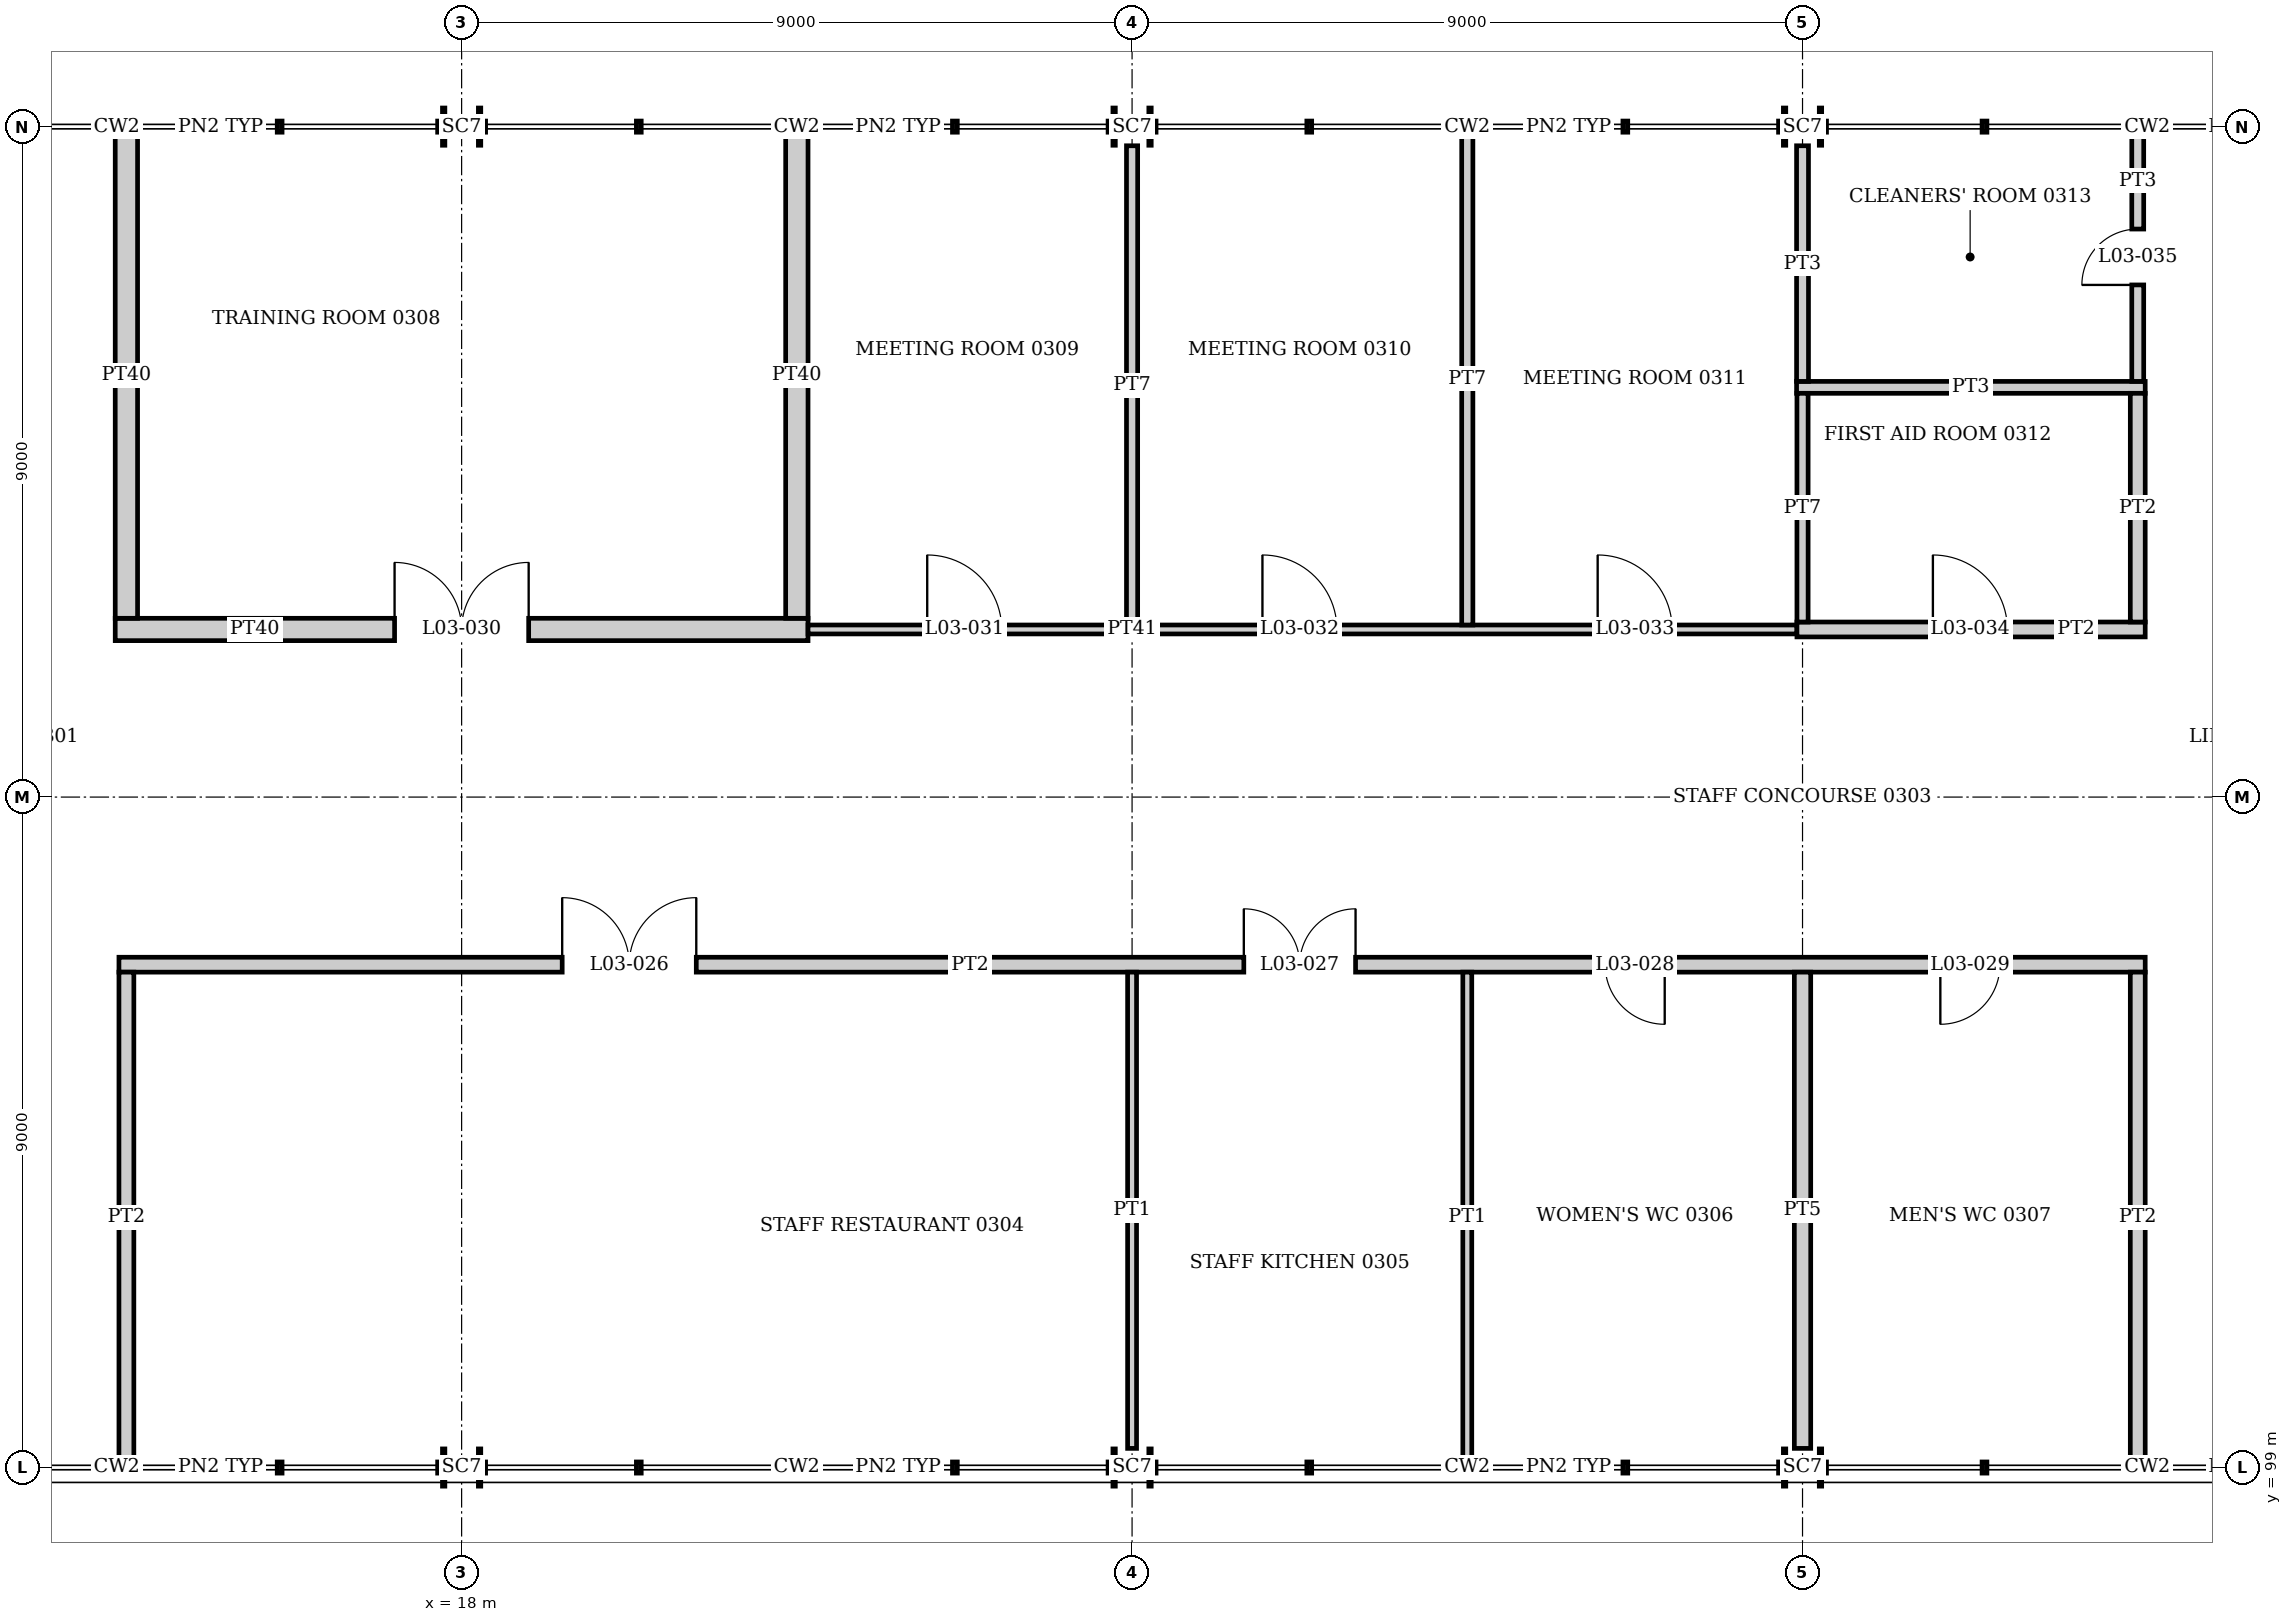
"""IFC4 building model, lengths in metres.
Left out: names, types, materials, properties, quantities, classifications, styles, units other than length and angle.
Written with IfcOpenShell. Run it as: python <this file> out.ifc"""

import sys

from ifc_helpers import new_model, si_unit, direction, frame, frame_2d, origin, origin_2d, place, context, subcontext, project, spatial, rectangle, i_section, extrude, element, fill, save


model = new_model("IFC4")
c1 = context("Model", 3, precision=1e-05, world=origin(), true_north=direction((0.0, 1.0)))
c2 = subcontext(c1, "Body", "Model", "MODEL_VIEW")
j1 = project(units=[si_unit("LENGTHUNIT", "METRE"), si_unit("PLANEANGLEUNIT", "RADIAN")], contexts=[c1])
p1 = place(None, origin())
s1 = spatial("IfcSite", under=j1, at=p1, CompositionType="ELEMENT")
p2 = place(p1, origin())
s2 = spatial("IfcBuilding", under=s1, at=p2, CompositionType="ELEMENT")
p3 = place(p2, frame((0.0, 0.0, 15.0)))
s3 = spatial("IfcBuildingStorey", under=s2, at=p3, CompositionType="ELEMENT", Elevation=15.0)
for number, where, z_axis, x_axis in (
    (1, (18.0, 99.0, 0.0), (0.0, 0.0, 1.0), (0.0, 1.0, 0.0)),
    (2, (18.0, 117.0, 0.0), (0.0, 0.0, 1.0), (0.0, 1.0, 0.0)),
    (3, (27.0, 99.0, 0.0), (0.0, 0.0, 1.0), (0.0, 1.0, 0.0)),
    (4, (27.0, 117.0, 0.0), (0.0, 0.0, 1.0), (0.0, 1.0, 0.0)),
    (5, (36.0, 99.0, 0.0), (0.0, 0.0, 1.0), (0.0, 1.0, 0.0)),
    (6, (36.0, 117.0, 0.0), (0.0, 0.0, 1.0), (0.0, 1.0, 0.0)),
):
    element("IfcColumn", number, at=place(p3, frame(where, z_axis=z_axis, x_axis=x_axis)), inside=s3, PredefinedType="COLUMN", context=c2, shape_type="SweptSolid", body=[
        extrude(i_section(OverallWidth=0.5, OverallDepth=0.514, WebThickness=0.025, FlangeThickness=0.032, at=origin_2d()), origin(), (0.0, 0.0, 1.0), 4.2),
    ])
p4 = place(p3, frame((13.4, 105.75, 0.0), z_axis=(0.0, 0.0, 1.0), x_axis=(1.0, 0.0, 0.0)))
e7 = element("IfcWall", 7, at=p4, inside=s3, PredefinedType="PARTITIONING", context=c2, shape_type="SweptSolid", body=[
    extrude(rectangle(XDim=27.2, YDim=0.2, at=frame_2d((13.6, 0.0))), origin(), (0.0, 0.0, 1.0), 3.25),
])
p5 = place(p4, frame((5.95, 0.0, 0.0)))
e8 = element("IfcOpeningElement", 8, at=p5, cuts=e7, PredefinedType="OPENING", context=c2, shape_type="SweptSolid", body=[
    extrude(rectangle(XDim=1.8, YDim=2.1, at=frame_2d((0.9, 1.05))), frame((0.0, 0.11, 0.0), z_axis=(0.0, -1.0, 0.0), x_axis=(1.0, 0.0, 0.0)), (0.0, 0.0, 1.0), 0.22),
])
p6 = place(p4, frame((15.1, 0.0, 0.0)))
e9 = element("IfcOpeningElement", 9, at=p6, cuts=e7, PredefinedType="OPENING", context=c2, shape_type="SweptSolid", body=[
    extrude(rectangle(XDim=1.5, YDim=2.1, at=frame_2d((0.75, 1.05))), frame((0.0, 0.11, 0.0), z_axis=(0.0, -1.0, 0.0), x_axis=(1.0, 0.0, 0.0)), (0.0, 0.0, 1.0), 0.22),
])
p7 = place(p4, frame((19.95, 0.0, 0.0)))
e10 = element("IfcOpeningElement", 10, at=p7, cuts=e7, PredefinedType="OPENING", context=c2, shape_type="SweptSolid", body=[
    extrude(rectangle(XDim=0.8, YDim=2.1, at=frame_2d((0.4, 1.05))), frame((0.0, 0.11, 0.0), z_axis=(0.0, -1.0, 0.0), x_axis=(1.0, 0.0, 0.0)), (0.0, 0.0, 1.0), 0.22),
])
p8 = place(p4, frame((24.45, 0.0, 0.0)))
e11 = element("IfcOpeningElement", 11, at=p8, cuts=e7, PredefinedType="OPENING", context=c2, shape_type="SweptSolid", body=[
    extrude(rectangle(XDim=0.8, YDim=2.1, at=frame_2d((0.4, 1.05))), frame((0.0, 0.11, 0.0), z_axis=(0.0, -1.0, 0.0), x_axis=(1.0, 0.0, 0.0)), (0.0, 0.0, 1.0), 0.22),
])
p9 = place(p3, frame((13.35, 110.25, 0.0), z_axis=(0.0, 0.0, 1.0), x_axis=(1.0, 0.0, 0.0)))
e12 = element("IfcWall", 12, at=p9, inside=s3, PredefinedType="PARTITIONING", context=c2, shape_type="SweptSolid", body=[
    extrude(rectangle(XDim=9.3, YDim=0.3, at=frame_2d((4.65, 0.0))), origin(), (0.0, 0.0, 1.0), 3.25),
])
p10 = place(p9, frame((3.75, 0.0, 0.0)))
e13 = element("IfcOpeningElement", 13, at=p10, cuts=e12, PredefinedType="OPENING", context=c2, shape_type="SweptSolid", body=[
    extrude(rectangle(XDim=1.8, YDim=2.1, at=frame_2d((0.9, 1.05))), frame((0.0, 0.16, 0.0), z_axis=(0.0, -1.0, 0.0), x_axis=(1.0, 0.0, 0.0)), (0.0, 0.0, 1.0), 0.32),
])
p11 = place(p3, frame((22.65, 110.25, 0.0), z_axis=(0.0, 0.0, 1.0), x_axis=(1.0, 0.0, 0.0)))
e14 = element("IfcWall", 14, at=p11, inside=s3, PredefinedType="PARTITIONING", context=c2, shape_type="SweptSolid", body=[
    extrude(rectangle(XDim=13.275, YDim=0.12, at=frame_2d((6.638, 0.0))), origin(), (0.0, 0.0, 1.0), 3.25),
])
p12 = place(p11, frame((1.6, 0.0, 0.0)))
e15 = element("IfcOpeningElement", 15, at=p12, cuts=e14, PredefinedType="OPENING", context=c2, shape_type="SweptSolid", body=[
    extrude(rectangle(XDim=1.0, YDim=2.1, at=frame_2d((0.5, 1.05))), frame((0.0, 0.07, 0.0), z_axis=(0.0, -1.0, 0.0), x_axis=(1.0, 0.0, 0.0)), (0.0, 0.0, 1.0), 0.14),
])
p13 = place(p11, frame((6.1, 0.0, 0.0)))
e16 = element("IfcOpeningElement", 16, at=p13, cuts=e14, PredefinedType="OPENING", context=c2, shape_type="SweptSolid", body=[
    extrude(rectangle(XDim=1.0, YDim=2.1, at=frame_2d((0.5, 1.05))), frame((0.0, 0.07, 0.0), z_axis=(0.0, -1.0, 0.0), x_axis=(1.0, 0.0, 0.0)), (0.0, 0.0, 1.0), 0.14),
])
p14 = place(p11, frame((10.6, 0.0, 0.0)))
e17 = element("IfcOpeningElement", 17, at=p14, cuts=e14, PredefinedType="OPENING", context=c2, shape_type="SweptSolid", body=[
    extrude(rectangle(XDim=1.0, YDim=2.1, at=frame_2d((0.5, 1.05))), frame((0.0, 0.07, 0.0), z_axis=(0.0, -1.0, 0.0), x_axis=(1.0, 0.0, 0.0)), (0.0, 0.0, 1.0), 0.14),
])
p15 = place(p3, frame((35.925, 110.25, 0.0), z_axis=(0.0, 0.0, 1.0), x_axis=(1.0, 0.0, 0.0)))
e18 = element("IfcWall", 18, at=p15, inside=s3, PredefinedType="PARTITIONING", context=c2, shape_type="SweptSolid", body=[
    extrude(rectangle(XDim=4.675, YDim=0.2, at=frame_2d((2.337, 0.0))), origin(), (0.0, 0.0, 1.0), 3.25),
])
p16 = place(p15, frame((1.825, 0.0, 0.0)))
e19 = element("IfcOpeningElement", 19, at=p16, cuts=e18, PredefinedType="OPENING", context=c2, shape_type="SweptSolid", body=[
    extrude(rectangle(XDim=1.0, YDim=2.1, at=frame_2d((0.5, 1.05))), frame((0.0, 0.11, 0.0), z_axis=(0.0, -1.0, 0.0), x_axis=(1.0, 0.0, 0.0)), (0.0, 0.0, 1.0), 0.22),
])
p17 = place(p3, frame((35.92, 113.5, 0.0), z_axis=(0.0, 0.0, 1.0), x_axis=(1.0, 0.0, 0.0)))
e20 = element("IfcWall", 20, at=p17, inside=s3, PredefinedType="PARTITIONING", context=c2, shape_type="SweptSolid", body=[
    extrude(rectangle(XDim=4.68, YDim=0.16, at=frame_2d((2.34, 0.0))), origin(), (0.0, 0.0, 1.0), 3.25),
])
p18 = place(p3, frame((13.5, 99.075, 0.0), z_axis=(0.0, 0.0, 1.0), x_axis=(0.0, 1.0, 0.0)))
e21 = element("IfcWall", 21, at=p18, inside=s3, PredefinedType="PARTITIONING", context=c2, shape_type="SweptSolid", body=[
    extrude(rectangle(XDim=6.575, YDim=0.2, at=frame_2d((3.288, 0.0))), origin(), (0.0, 0.0, 1.0), 3.25),
])
for number, where, z_axis, x_axis in (
    (22, (13.5, 110.4, 0.0), (0.0, 0.0, 1.0), (0.0, 1.0, 0.0)),
    (23, (22.5, 110.4, 0.0), (0.0, 0.0, 1.0), (0.0, 1.0, 0.0)),
):
    element("IfcWall", number, at=place(p3, frame(where, z_axis=z_axis, x_axis=x_axis)), inside=s3, PredefinedType="PARTITIONING", context=c2, shape_type="SweptSolid", body=[
        extrude(rectangle(XDim=6.525, YDim=0.3, at=frame_2d((3.263, 0.0))), origin(), (0.0, 0.0, 1.0), 3.25),
    ])
p19 = place(p3, frame((27.0, 99.257, 0.0), z_axis=(0.0, 0.0, 1.0), x_axis=(0.0, 1.0, 0.0)))
e24 = element("IfcWall", 24, at=p19, inside=s3, PredefinedType="PARTITIONING", context=c2, shape_type="SweptSolid", body=[
    extrude(rectangle(XDim=6.393, YDim=0.12, at=frame_2d((3.196, 0.0))), origin(), (0.0, 0.0, 1.0), 3.25),
])
p20 = place(p3, frame((27.0, 110.31, 0.0), z_axis=(0.0, 0.0, 1.0), x_axis=(0.0, 1.0, 0.0)))
e25 = element("IfcWall", 25, at=p20, inside=s3, PredefinedType="PARTITIONING", context=c2, shape_type="SweptSolid", body=[
    extrude(rectangle(XDim=6.433, YDim=0.15, at=frame_2d((3.216, 0.0))), origin(), (0.0, 0.0, 1.0), 3.25),
])
p21 = place(p3, frame((31.5, 99.075, 0.0), z_axis=(0.0, 0.0, 1.0), x_axis=(0.0, 1.0, 0.0)))
e26 = element("IfcWall", 26, at=p21, inside=s3, PredefinedType="PARTITIONING", context=c2, shape_type="SweptSolid", body=[
    extrude(rectangle(XDim=6.575, YDim=0.12, at=frame_2d((3.288, 0.0))), origin(), (0.0, 0.0, 1.0), 3.25),
])
p22 = place(p3, frame((31.5, 110.31, 0.0), z_axis=(0.0, 0.0, 1.0), x_axis=(0.0, 1.0, 0.0)))
e27 = element("IfcWall", 27, at=p22, inside=s3, PredefinedType="PARTITIONING", context=c2, shape_type="SweptSolid", body=[
    extrude(rectangle(XDim=6.615, YDim=0.15, at=frame_2d((3.308, 0.0))), origin(), (0.0, 0.0, 1.0), 3.25),
])
p23 = place(p3, frame((36.0, 99.257, 0.0), z_axis=(0.0, 0.0, 1.0), x_axis=(0.0, 1.0, 0.0)))
e28 = element("IfcWall", 28, at=p23, inside=s3, PredefinedType="PLUMBINGWALL", context=c2, shape_type="SweptSolid", body=[
    extrude(rectangle(XDim=6.393, YDim=0.22, at=frame_2d((3.196, 0.0))), origin(), (0.0, 0.0, 1.0), 3.25),
])
p24 = place(p3, frame((36.0, 110.35, 0.0), z_axis=(0.0, 0.0, 1.0), x_axis=(0.0, 1.0, 0.0)))
e29 = element("IfcWall", 29, at=p24, inside=s3, PredefinedType="PARTITIONING", context=c2, shape_type="SweptSolid", body=[
    extrude(rectangle(XDim=3.07, YDim=0.15, at=frame_2d((1.535, 0.0))), origin(), (0.0, 0.0, 1.0), 3.25),
])
p25 = place(p3, frame((36.0, 113.58, 0.0), z_axis=(0.0, 0.0, 1.0), x_axis=(0.0, 1.0, 0.0)))
e30 = element("IfcWall", 30, at=p25, inside=s3, PredefinedType="PARTITIONING", context=c2, shape_type="SweptSolid", body=[
    extrude(rectangle(XDim=3.163, YDim=0.16, at=frame_2d((1.582, 0.0))), origin(), (0.0, 0.0, 1.0), 3.25),
])
p26 = place(p3, frame((40.5, 99.075, 0.0), z_axis=(0.0, 0.0, 1.0), x_axis=(0.0, 1.0, 0.0)))
e31 = element("IfcWall", 31, at=p26, inside=s3, PredefinedType="PARTITIONING", context=c2, shape_type="SweptSolid", body=[
    extrude(rectangle(XDim=6.575, YDim=0.2, at=frame_2d((3.288, 0.0))), origin(), (0.0, 0.0, 1.0), 3.25),
])
p27 = place(p3, frame((40.5, 110.35, 0.0), z_axis=(0.0, 0.0, 1.0), x_axis=(0.0, 1.0, 0.0)))
e32 = element("IfcWall", 32, at=p27, inside=s3, PredefinedType="PARTITIONING", context=c2, shape_type="SweptSolid", body=[
    extrude(rectangle(XDim=3.07, YDim=0.2, at=frame_2d((1.535, 0.0))), origin(), (0.0, 0.0, 1.0), 3.25),
])
p28 = place(p3, frame((40.5, 113.58, 0.0), z_axis=(0.0, 0.0, 1.0), x_axis=(0.0, 1.0, 0.0)))
e33 = element("IfcWall", 33, at=p28, inside=s3, PredefinedType="PARTITIONING", context=c2, shape_type="SweptSolid", body=[
    extrude(rectangle(XDim=3.345, YDim=0.16, at=frame_2d((1.672, 0.0))), origin(), (0.0, 0.0, 1.0), 3.25),
])
p29 = place(p28, frame((1.295, 0.0, 0.0)))
e34 = element("IfcOpeningElement", 34, at=p29, cuts=e33, PredefinedType="OPENING", context=c2, shape_type="SweptSolid", body=[
    extrude(rectangle(XDim=0.75, YDim=2.1, at=frame_2d((0.375, 1.05))), frame((0.0, 0.09, 0.0), z_axis=(0.0, -1.0, 0.0), x_axis=(1.0, 0.0, 0.0)), (0.0, 0.0, 1.0), 0.18),
])
p30 = place(p5, origin())
e35 = element("IfcDoor", 35, at=p30, inside=s3, OperationType="DOUBLE_DOOR_SINGLE_SWING", PredefinedType="DOOR", context=c2, shape_type="SweptSolid", body=[
    extrude(rectangle(XDim=1.8, YDim=2.1, at=frame_2d((0.9, 1.05))), frame((0.0, 0.025, 0.0), z_axis=(0.0, -1.0, 0.0), x_axis=(1.0, 0.0, 0.0)), (0.0, 0.0, 1.0), 0.05),
])
fill(e8, e35)
p31 = place(p6, origin())
e36 = element("IfcDoor", 36, at=p31, inside=s3, OperationType="DOUBLE_DOOR_SINGLE_SWING", PredefinedType="DOOR", context=c2, shape_type="SweptSolid", body=[
    extrude(rectangle(XDim=1.5, YDim=2.1, at=frame_2d((0.75, 1.05))), frame((0.0, 0.025, 0.0), z_axis=(0.0, -1.0, 0.0), x_axis=(1.0, 0.0, 0.0)), (0.0, 0.0, 1.0), 0.05),
])
fill(e9, e36)
p32 = place(p7, frame((0.8, 0.0, 0.0), z_axis=(0.0, 0.0, 1.0), x_axis=(-1.0, 0.0, 0.0)))
e37 = element("IfcDoor", 37, at=p32, inside=s3, OperationType="SINGLE_SWING_LEFT", PredefinedType="DOOR", context=c2, shape_type="SweptSolid", body=[
    extrude(rectangle(XDim=0.8, YDim=2.1, at=frame_2d((0.4, 1.05))), frame((0.0, 0.025, 0.0), z_axis=(0.0, -1.0, 0.0), x_axis=(1.0, 0.0, 0.0)), (0.0, 0.0, 1.0), 0.05),
])
fill(e10, e37)
p33 = place(p8, frame((0.8, 0.0, 0.0), z_axis=(0.0, 0.0, 1.0), x_axis=(-1.0, 0.0, 0.0)))
e38 = element("IfcDoor", 38, at=p33, inside=s3, OperationType="SINGLE_SWING_RIGHT", PredefinedType="DOOR", context=c2, shape_type="SweptSolid", body=[
    extrude(rectangle(XDim=0.8, YDim=2.1, at=frame_2d((0.4, 1.05))), frame((0.0, 0.025, 0.0), z_axis=(0.0, -1.0, 0.0), x_axis=(1.0, 0.0, 0.0)), (0.0, 0.0, 1.0), 0.05),
])
fill(e11, e38)
p34 = place(p10, origin())
e39 = element("IfcDoor", 39, at=p34, inside=s3, OperationType="DOUBLE_DOOR_SINGLE_SWING", PredefinedType="DOOR", context=c2, shape_type="SweptSolid", body=[
    extrude(rectangle(XDim=1.8, YDim=2.1, at=frame_2d((0.9, 1.05))), frame((0.0, 0.025, 0.0), z_axis=(0.0, -1.0, 0.0), x_axis=(1.0, 0.0, 0.0)), (0.0, 0.0, 1.0), 0.05),
])
fill(e13, e39)
p35 = place(p12, origin())
e40 = element("IfcDoor", 40, at=p35, inside=s3, OperationType="SINGLE_SWING_LEFT", PredefinedType="DOOR", context=c2, shape_type="SweptSolid", body=[
    extrude(rectangle(XDim=1.0, YDim=2.1, at=frame_2d((0.5, 1.05))), frame((0.0, 0.025, 0.0), z_axis=(0.0, -1.0, 0.0), x_axis=(1.0, 0.0, 0.0)), (0.0, 0.0, 1.0), 0.05),
])
fill(e15, e40)
p36 = place(p13, origin())
e41 = element("IfcDoor", 41, at=p36, inside=s3, OperationType="SINGLE_SWING_LEFT", PredefinedType="DOOR", context=c2, shape_type="SweptSolid", body=[
    extrude(rectangle(XDim=1.0, YDim=2.1, at=frame_2d((0.5, 1.05))), frame((0.0, 0.025, 0.0), z_axis=(0.0, -1.0, 0.0), x_axis=(1.0, 0.0, 0.0)), (0.0, 0.0, 1.0), 0.05),
])
fill(e16, e41)
p37 = place(p14, origin())
e42 = element("IfcDoor", 42, at=p37, inside=s3, OperationType="SINGLE_SWING_LEFT", PredefinedType="DOOR", context=c2, shape_type="SweptSolid", body=[
    extrude(rectangle(XDim=1.0, YDim=2.1, at=frame_2d((0.5, 1.05))), frame((0.0, 0.025, 0.0), z_axis=(0.0, -1.0, 0.0), x_axis=(1.0, 0.0, 0.0)), (0.0, 0.0, 1.0), 0.05),
])
fill(e17, e42)
p38 = place(p16, origin())
e43 = element("IfcDoor", 43, at=p38, inside=s3, OperationType="SINGLE_SWING_LEFT", PredefinedType="DOOR", context=c2, shape_type="SweptSolid", body=[
    extrude(rectangle(XDim=1.0, YDim=2.1, at=frame_2d((0.5, 1.05))), frame((0.0, 0.025, 0.0), z_axis=(0.0, -1.0, 0.0), x_axis=(1.0, 0.0, 0.0)), (0.0, 0.0, 1.0), 0.05),
])
fill(e19, e43)
p39 = place(p29, origin())
e44 = element("IfcDoor", 44, at=p39, inside=s3, OperationType="SINGLE_SWING_LEFT", PredefinedType="DOOR", context=c2, shape_type="SweptSolid", body=[
    extrude(rectangle(XDim=0.75, YDim=2.1, at=frame_2d((0.375, 1.05))), frame((0.0, 0.025, 0.0), z_axis=(0.0, -1.0, 0.0), x_axis=(1.0, 0.0, 0.0)), (0.0, 0.0, 1.0), 0.05),
])
fill(e34, e44)
save(model, sys.argv[1])
